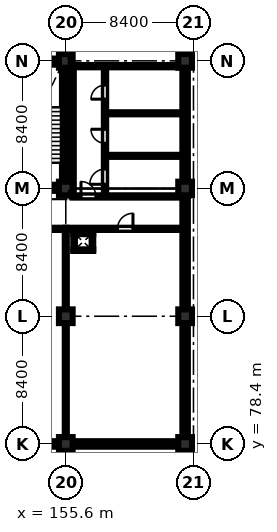
"""IFC4 building model, lengths in metres.
Left out: names, types, materials, properties, quantities, classifications, styles, units other than length and angle.
Written with IfcOpenShell. Run it as: python <this file> out.ifc"""

import sys

from ifc_helpers import new_model, si_unit, direction, frame, frame_2d, origin, origin_2d, place, context, subcontext, project, spatial, rectangle, extrude, element, fill, save


model = new_model("IFC4")
c1 = context("Model", 3, precision=1e-05, world=origin(), true_north=direction((0.0, 1.0)))
c2 = subcontext(c1, "Body", "Model", "MODEL_VIEW")
j1 = project(units=[si_unit("LENGTHUNIT", "METRE"), si_unit("PLANEANGLEUNIT", "RADIAN")], contexts=[c1])
p1 = place(None, origin())
s1 = spatial("IfcSite", under=j1, at=p1, CompositionType="ELEMENT")
p2 = place(p1, origin())
s2 = spatial("IfcBuilding", under=s1, at=p2, CompositionType="ELEMENT")
p3 = place(p2, frame((0.0, 0.0, 14.7)))
s3 = spatial("IfcBuildingStorey", under=s2, at=p3, CompositionType="ELEMENT", Elevation=14.7)
for number, where, z_axis, x_axis in (
    (1, (155.6, 78.4, 0.0), (0.0, 0.0, 1.0), (1.0, 0.0, 0.0)),
    (2, (155.6, 86.8, 0.0), (0.0, 0.0, 1.0), (1.0, 0.0, 0.0)),
    (3, (155.6, 95.2, 0.0), (0.0, 0.0, 1.0), (1.0, 0.0, 0.0)),
    (4, (155.6, 103.6, 0.0), (0.0, 0.0, 1.0), (1.0, 0.0, 0.0)),
    (5, (163.45, 78.4, 0.0), (0.0, 0.0, 1.0), (1.0, 0.0, 0.0)),
    (6, (163.45, 86.8, 0.0), (0.0, 0.0, 1.0), (1.0, 0.0, 0.0)),
    (7, (163.45, 95.2, 0.0), (0.0, 0.0, 1.0), (1.0, 0.0, 0.0)),
    (8, (163.45, 103.6, 0.0), (0.0, 0.0, 1.0), (1.0, 0.0, 0.0)),
):
    element("IfcColumn", number, at=place(p3, frame(where, z_axis=z_axis, x_axis=x_axis)), inside=s3, PredefinedType="COLUMN", context=c2, shape_type="SweptSolid", body=[
        extrude(rectangle(XDim=0.9, YDim=0.9, at=origin_2d()), origin(), (0.0, 0.0, 1.0), 4.26),
    ])
for number, where, z_axis, x_axis in (
    (9, (151.85, 95.25, 0.0), (0.0, 0.0, 1.0), (1.0, 0.0, 0.0)),
    (10, (151.85, 103.55, 0.0), (0.0, 0.0, 1.0), (1.0, 0.0, 0.0)),
):
    element("IfcWall", number, at=place(p3, frame(where, z_axis=z_axis, x_axis=x_axis)), inside=s3, PredefinedType="SHEAR", context=c2, shape_type="SweptSolid", body=[
        extrude(rectangle(XDim=3.9, YDim=0.4, at=frame_2d((1.95, 0.0))), origin(), (0.0, 0.0, 1.0), 4.26),
    ])
p4 = place(p3, frame((155.55, 95.45, 0.0), z_axis=(0.0, 0.0, 1.0), x_axis=(0.0, 1.0, 0.0)))
e11 = element("IfcWall", 11, at=p4, inside=s3, PredefinedType="SHEAR", context=c2, shape_type="SweptSolid", body=[
    extrude(rectangle(XDim=7.9, YDim=0.4, at=frame_2d((3.95, 0.0))), origin(), (0.0, 0.0, 1.0), 4.26),
])
p5 = place(p3, frame((155.15, 78.4, 0.0), z_axis=(0.0, 0.0, 1.0), x_axis=(-1.0, 0.0, 0.0)))
e12 = element("IfcWall", 12, at=p5, inside=s3, PredefinedType="STANDARD", context=c2, shape_type="SweptSolid", body=[
    extrude(rectangle(XDim=7.5, YDim=0.36, at=frame_2d((3.75, 0.0))), origin(), (0.0, 0.0, 1.0), 3.56),
])
p6 = place(p5, frame((1.15, 0.0, 0.95)))
e13 = element("IfcOpeningElement", 13, at=p6, cuts=e12, PredefinedType="OPENING", context=c2, shape_type="SweptSolid", body=[
    extrude(rectangle(XDim=1.5, YDim=1.5, at=frame_2d((0.75, 0.75))), frame((0.0, 0.19, 0.0), z_axis=(0.0, -1.0, 0.0), x_axis=(1.0, 0.0, 0.0)), (0.0, 0.0, 1.0), 0.38),
])
p7 = place(p3, frame((163.0, 78.4, 0.0), z_axis=(0.0, 0.0, 1.0), x_axis=(-1.0, 0.0, 0.0)))
e14 = element("IfcWall", 14, at=p7, inside=s3, PredefinedType="STANDARD", context=c2, shape_type="SweptSolid", body=[
    extrude(rectangle(XDim=6.95, YDim=0.36, at=frame_2d((3.475, 0.0))), origin(), (0.0, 0.0, 1.0), 3.56),
])
p8 = place(p7, frame((1.15, 0.0, 0.95)))
e15 = element("IfcOpeningElement", 15, at=p8, cuts=e14, PredefinedType="OPENING", context=c2, shape_type="SweptSolid", body=[
    extrude(rectangle(XDim=1.5, YDim=1.5, at=frame_2d((0.75, 0.75))), frame((0.0, 0.19, 0.0), z_axis=(0.0, -1.0, 0.0), x_axis=(1.0, 0.0, 0.0)), (0.0, 0.0, 1.0), 0.38),
])
p9 = place(p3, frame((163.45, 86.35, 0.0), z_axis=(0.0, 0.0, 1.0), x_axis=(0.0, -1.0, 0.0)))
e16 = element("IfcWall", 16, at=p9, inside=s3, PredefinedType="STANDARD", context=c2, shape_type="SweptSolid", body=[
    extrude(rectangle(XDim=7.5, YDim=0.36, at=frame_2d((3.75, 0.0))), origin(), (0.0, 0.0, 1.0), 3.56),
])
p10 = place(p9, frame((1.15, 0.0, 1.1)))
e17 = element("IfcOpeningElement", 17, at=p10, cuts=e16, PredefinedType="OPENING", context=c2, shape_type="SweptSolid", body=[
    extrude(rectangle(XDim=1.8, YDim=1.8, at=frame_2d((0.9, 0.9))), frame((0.0, 0.19, 0.0), z_axis=(0.0, -1.0, 0.0), x_axis=(1.0, 0.0, 0.0)), (0.0, 0.0, 1.0), 0.38),
])
p11 = place(p3, frame((163.45, 94.75, 0.0), z_axis=(0.0, 0.0, 1.0), x_axis=(0.0, -1.0, 0.0)))
e18 = element("IfcWall", 18, at=p11, inside=s3, PredefinedType="STANDARD", context=c2, shape_type="SweptSolid", body=[
    extrude(rectangle(XDim=7.5, YDim=0.36, at=frame_2d((3.75, 0.0))), origin(), (0.0, 0.0, 1.0), 3.56),
])
p12 = place(p11, frame((4.2, 0.0, 1.1)))
e19 = element("IfcOpeningElement", 19, at=p12, cuts=e18, PredefinedType="OPENING", context=c2, shape_type="SweptSolid", body=[
    extrude(rectangle(XDim=1.8, YDim=1.8, at=frame_2d((0.9, 0.9))), frame((0.0, 0.19, 0.0), z_axis=(0.0, -1.0, 0.0), x_axis=(1.0, 0.0, 0.0)), (0.0, 0.0, 1.0), 0.38),
])
p13 = place(p3, frame((163.45, 103.15, 0.0), z_axis=(0.0, 0.0, 1.0), x_axis=(0.0, -1.0, 0.0)))
e20 = element("IfcWall", 20, at=p13, inside=s3, PredefinedType="STANDARD", context=c2, shape_type="SweptSolid", body=[
    extrude(rectangle(XDim=7.5, YDim=0.36, at=frame_2d((3.75, 0.0))), origin(), (0.0, 0.0, 1.0), 3.56),
])
p14 = place(p13, frame((1.15, 0.0, 1.1)))
e21 = element("IfcOpeningElement", 21, at=p14, cuts=e20, PredefinedType="OPENING", context=c2, shape_type="SweptSolid", body=[
    extrude(rectangle(XDim=1.4, YDim=1.4, at=frame_2d((0.7, 0.7))), frame((0.0, 0.19, 0.0), z_axis=(0.0, -1.0, 0.0), x_axis=(1.0, 0.0, 0.0)), (0.0, 0.0, 1.0), 0.38),
])
p15 = place(p3, frame((163.45, 111.0, 0.0), z_axis=(0.0, 0.0, 1.0), x_axis=(0.0, -1.0, 0.0)))
e22 = element("IfcWall", 22, at=p15, inside=s3, PredefinedType="STANDARD", context=c2, shape_type="SweptSolid", body=[
    extrude(rectangle(XDim=6.95, YDim=0.36, at=frame_2d((3.475, 0.0))), origin(), (0.0, 0.0, 1.0), 3.56),
])
p16 = place(p15, frame((1.15, 0.0, 1.1)))
e23 = element("IfcOpeningElement", 23, at=p16, cuts=e22, PredefinedType="OPENING", context=c2, shape_type="SweptSolid", body=[
    extrude(rectangle(XDim=1.8, YDim=1.8, at=frame_2d((0.9, 0.9))), frame((0.0, 0.19, 0.0), z_axis=(0.0, -1.0, 0.0), x_axis=(1.0, 0.0, 0.0)), (0.0, 0.0, 1.0), 0.38),
])
p17 = place(p3, frame((156.05, 94.68, 0.0), z_axis=(0.0, 0.0, 1.0), x_axis=(1.0, 0.0, 0.0)))
e24 = element("IfcWall", 24, at=p17, inside=s3, PredefinedType="PARTITIONING", context=c2, shape_type="SweptSolid", body=[
    extrude(rectangle(XDim=7.15, YDim=0.15, at=frame_2d((3.575, 0.0))), origin(), (0.0, 0.0, 1.0), 4.26),
])
p18 = place(p17, frame((0.55, 0.0, 0.0)))
e25 = element("IfcOpeningElement", 25, at=p18, cuts=e24, PredefinedType="OPENING", context=c2, shape_type="SweptSolid", body=[
    extrude(rectangle(XDim=0.98, YDim=2.12, at=frame_2d((0.49, 1.06))), frame((0.0, 0.085, 0.0), z_axis=(0.0, -1.0, 0.0), x_axis=(1.0, 0.0, 0.0)), (0.0, 0.0, 1.0), 0.17),
])
p19 = place(p3, frame((158.18, 94.68, 0.0), z_axis=(0.0, 0.0, 1.0), x_axis=(0.0, 1.0, 0.0)))
e26 = element("IfcWall", 26, at=p19, inside=s3, PredefinedType="PARTITIONING", context=c2, shape_type="SweptSolid", body=[
    extrude(rectangle(XDim=8.57, YDim=0.15, at=frame_2d((4.285, 0.0))), origin(), (0.0, 0.0, 1.0), 4.26),
])
p20 = place(p19, frame((0.8, 0.0, 0.0)))
e27 = element("IfcOpeningElement", 27, at=p20, cuts=e26, PredefinedType="OPENING", context=c2, shape_type="SweptSolid", body=[
    extrude(rectangle(XDim=1.0, YDim=2.12, at=frame_2d((0.5, 1.06))), frame((0.0, 0.085, 0.0), z_axis=(0.0, -1.0, 0.0), x_axis=(1.0, 0.0, 0.0)), (0.0, 0.0, 1.0), 0.17),
])
p21 = place(p19, frame((3.5, 0.0, 0.0)))
e28 = element("IfcOpeningElement", 28, at=p21, cuts=e26, PredefinedType="OPENING", context=c2, shape_type="SweptSolid", body=[
    extrude(rectangle(XDim=0.92, YDim=2.1, at=frame_2d((0.46, 1.05))), frame((0.0, 0.085, 0.0), z_axis=(0.0, -1.0, 0.0), x_axis=(1.0, 0.0, 0.0)), (0.0, 0.0, 1.0), 0.17),
])
p22 = place(p19, frame((6.4, 0.0, 0.0)))
e29 = element("IfcOpeningElement", 29, at=p22, cuts=e26, PredefinedType="OPENING", context=c2, shape_type="SweptSolid", body=[
    extrude(rectangle(XDim=0.92, YDim=2.1, at=frame_2d((0.46, 1.05))), frame((0.0, 0.085, 0.0), z_axis=(0.0, -1.0, 0.0), x_axis=(1.0, 0.0, 0.0)), (0.0, 0.0, 1.0), 0.17),
])
for number, where, z_axis, x_axis in (
    (30, (158.18, 97.35, 0.0), (0.0, 0.0, 1.0), (1.0, 0.0, 0.0)),
    (31, (158.18, 100.15, 0.0), (0.0, 0.0, 1.0), (1.0, 0.0, 0.0)),
):
    element("IfcWall", number, at=place(p3, frame(where, z_axis=z_axis, x_axis=x_axis)), inside=s3, PredefinedType="PARTITIONING", context=c2, shape_type="SweptSolid", body=[
        extrude(rectangle(XDim=5.02, YDim=0.135, at=frame_2d((2.51, 0.0))), origin(), (0.0, 0.0, 1.0), 4.26),
    ])
p23 = place(p3, frame((156.05, 103.25, 0.0), z_axis=(0.0, 0.0, 1.0), x_axis=(1.0, 0.0, 0.0)))
e32 = element("IfcWall", 32, at=p23, inside=s3, PredefinedType="PARTITIONING", context=c2, shape_type="SweptSolid", body=[
    extrude(rectangle(XDim=7.15, YDim=0.15, at=frame_2d((3.575, 0.0))), origin(), (0.0, 0.0, 1.0), 4.26),
])
p24 = place(p3, frame((156.05, 94.68, 0.0), z_axis=(0.0, 0.0, 1.0), x_axis=(0.0, 1.0, 0.0)))
e33 = element("IfcWall", 33, at=p24, inside=s3, PredefinedType="PARTITIONING", context=c2, shape_type="SweptSolid", body=[
    extrude(rectangle(XDim=8.57, YDim=0.15, at=frame_2d((4.285, 0.0))), origin(), (0.0, 0.0, 1.0), 4.26),
])
p25 = place(p3, frame((147.2, 92.55, 0.0), z_axis=(0.0, 0.0, 1.0), x_axis=(1.0, 0.0, 0.0)))
e34 = element("IfcWall", 34, at=p25, inside=s3, PredefinedType="PARTITIONING", context=c2, shape_type="SweptSolid", body=[
    extrude(rectangle(XDim=8.4, YDim=0.145, at=frame_2d((4.2, 0.0))), origin(), (0.0, 0.0, 1.0), 4.26),
])
p26 = place(p25, frame((3.4, 0.0, 0.0)))
e35 = element("IfcOpeningElement", 35, at=p26, cuts=e34, PredefinedType="OPENING", context=c2, shape_type="SweptSolid", body=[
    extrude(rectangle(XDim=1.02, YDim=2.15, at=frame_2d((0.51, 1.075))), frame((0.0, 0.083, 0.0), z_axis=(0.0, -1.0, 0.0), x_axis=(1.0, 0.0, 0.0)), (0.0, 0.0, 1.0), 0.165),
])
p27 = place(p3, frame((155.6, 92.55, 0.0), z_axis=(0.0, 0.0, 1.0), x_axis=(1.0, 0.0, 0.0)))
e36 = element("IfcWall", 36, at=p27, inside=s3, PredefinedType="PARTITIONING", context=c2, shape_type="SweptSolid", body=[
    extrude(rectangle(XDim=7.75, YDim=0.145, at=frame_2d((3.875, 0.0))), origin(), (0.0, 0.0, 1.0), 4.26),
])
p28 = place(p27, frame((3.4, 0.0, 0.0)))
e37 = element("IfcOpeningElement", 37, at=p28, cuts=e36, PredefinedType="OPENING", context=c2, shape_type="SweptSolid", body=[
    extrude(rectangle(XDim=1.02, YDim=2.15, at=frame_2d((0.51, 1.075))), frame((0.0, 0.083, 0.0), z_axis=(0.0, -1.0, 0.0), x_axis=(1.0, 0.0, 0.0)), (0.0, 0.0, 1.0), 0.165),
])
p29 = place(p3, frame((155.6, 78.55, 0.0), z_axis=(0.0, 0.0, 1.0), x_axis=(0.0, 1.0, 0.0)))
e38 = element("IfcWall", 38, at=p29, inside=s3, PredefinedType="PARTITIONING", context=c2, shape_type="SweptSolid", body=[
    extrude(rectangle(XDim=14.0, YDim=0.135, at=frame_2d((7.0, 0.0))), origin(), (0.0, 0.0, 1.0), 3.51),
])
for number, where, z_axis, x_axis in (
    (39, (156.095, 91.147, 0.0), (0.0, 0.0, 1.0), (1.0, 0.0, 0.0)),
    (40, (156.095, 92.252, 0.0), (0.0, 0.0, 1.0), (1.0, 0.0, 0.0)),
):
    element("IfcWall", number, at=place(p3, frame(where, z_axis=z_axis, x_axis=x_axis)), inside=s3, PredefinedType="PARTITIONING", context=c2, shape_type="SweptSolid", body=[
        extrude(rectangle(XDim=1.31, YDim=0.105, at=frame_2d((0.655, 0.0))), origin(), (0.0, 0.0, 1.0), 4.26),
    ])
for number, where, z_axis, x_axis in (
    (41, (156.147, 91.2, 0.0), (0.0, 0.0, 1.0), (0.0, 1.0, 0.0)),
    (42, (157.353, 91.2, 0.0), (0.0, 0.0, 1.0), (0.0, 1.0, 0.0)),
):
    element("IfcWall", number, at=place(p3, frame(where, z_axis=z_axis, x_axis=x_axis)), inside=s3, PredefinedType="PARTITIONING", context=c2, shape_type="SweptSolid", body=[
        extrude(rectangle(XDim=1.0, YDim=0.105, at=frame_2d((0.5, 0.0))), origin(), (0.0, 0.0, 1.0), 4.26),
    ])
p30 = place(p8, origin())
e43 = element("IfcWindow", 43, at=p30, inside=s3, PartitioningType="DOUBLE_PANEL_VERTICAL", PredefinedType="WINDOW", context=c2, shape_type="SweptSolid", body=[
    extrude(rectangle(XDim=1.5, YDim=1.5, at=frame_2d((0.75, 0.75))), frame((0.0, 0.03, 0.0), z_axis=(0.0, -1.0, 0.0), x_axis=(1.0, 0.0, 0.0)), (0.0, 0.0, 1.0), 0.06),
])
fill(e15, e43)
p31 = place(p10, origin())
e44 = element("IfcWindow", 44, at=p31, inside=s3, PartitioningType="DOUBLE_PANEL_VERTICAL", PredefinedType="WINDOW", context=c2, shape_type="SweptSolid", body=[
    extrude(rectangle(XDim=1.8, YDim=1.8, at=frame_2d((0.9, 0.9))), frame((0.0, 0.03, 0.0), z_axis=(0.0, -1.0, 0.0), x_axis=(1.0, 0.0, 0.0)), (0.0, 0.0, 1.0), 0.06),
])
fill(e17, e44)
p32 = place(p12, origin())
e45 = element("IfcWindow", 45, at=p32, inside=s3, PartitioningType="DOUBLE_PANEL_VERTICAL", PredefinedType="WINDOW", context=c2, shape_type="SweptSolid", body=[
    extrude(rectangle(XDim=1.8, YDim=1.8, at=frame_2d((0.9, 0.9))), frame((0.0, 0.03, 0.0), z_axis=(0.0, -1.0, 0.0), x_axis=(1.0, 0.0, 0.0)), (0.0, 0.0, 1.0), 0.06),
])
fill(e19, e45)
p33 = place(p14, origin())
e46 = element("IfcWindow", 46, at=p33, inside=s3, PartitioningType="SINGLE_PANEL", PredefinedType="WINDOW", context=c2, shape_type="SweptSolid", body=[
    extrude(rectangle(XDim=1.4, YDim=1.4, at=frame_2d((0.7, 0.7))), frame((0.0, 0.03, 0.0), z_axis=(0.0, -1.0, 0.0), x_axis=(1.0, 0.0, 0.0)), (0.0, 0.0, 1.0), 0.06),
])
fill(e21, e46)
p34 = place(p18, origin())
e47 = element("IfcDoor", 47, at=p34, inside=s3, OperationType="SINGLE_SWING_LEFT", PredefinedType="DOOR", context=c2, shape_type="SweptSolid", body=[
    extrude(rectangle(XDim=0.98, YDim=2.12, at=frame_2d((0.49, 1.06))), frame((0.0, 0.025, 0.0), z_axis=(0.0, -1.0, 0.0), x_axis=(1.0, 0.0, 0.0)), (0.0, 0.0, 1.0), 0.05),
])
fill(e25, e47)
p35 = place(p20, origin())
e48 = element("IfcDoor", 48, at=p35, inside=s3, OperationType="SINGLE_SWING_LEFT", PredefinedType="DOOR", context=c2, shape_type="SweptSolid", body=[
    extrude(rectangle(XDim=1.0, YDim=2.12, at=frame_2d((0.5, 1.06))), frame((0.0, 0.025, 0.0), z_axis=(0.0, -1.0, 0.0), x_axis=(1.0, 0.0, 0.0)), (0.0, 0.0, 1.0), 0.05),
])
fill(e27, e48)
p36 = place(p21, origin())
e49 = element("IfcDoor", 49, at=p36, inside=s3, OperationType="SINGLE_SWING_RIGHT", PredefinedType="DOOR", context=c2, shape_type="SweptSolid", body=[
    extrude(rectangle(XDim=0.92, YDim=2.1, at=frame_2d((0.46, 1.05))), frame((0.0, 0.025, 0.0), z_axis=(0.0, -1.0, 0.0), x_axis=(1.0, 0.0, 0.0)), (0.0, 0.0, 1.0), 0.05),
])
fill(e28, e49)
p37 = place(p22, origin())
e50 = element("IfcDoor", 50, at=p37, inside=s3, OperationType="SINGLE_SWING_LEFT", PredefinedType="DOOR", context=c2, shape_type="SweptSolid", body=[
    extrude(rectangle(XDim=0.92, YDim=2.1, at=frame_2d((0.46, 1.05))), frame((0.0, 0.025, 0.0), z_axis=(0.0, -1.0, 0.0), x_axis=(1.0, 0.0, 0.0)), (0.0, 0.0, 1.0), 0.05),
])
fill(e29, e50)
p38 = place(p28, origin())
e51 = element("IfcDoor", 51, at=p38, inside=s3, OperationType="SINGLE_SWING_RIGHT", PredefinedType="DOOR", context=c2, shape_type="SweptSolid", body=[
    extrude(rectangle(XDim=1.02, YDim=2.15, at=frame_2d((0.51, 1.075))), frame((0.0, 0.025, 0.0), z_axis=(0.0, -1.0, 0.0), x_axis=(1.0, 0.0, 0.0)), (0.0, 0.0, 1.0), 0.05),
])
fill(e37, e51)
save(model, sys.argv[1])
